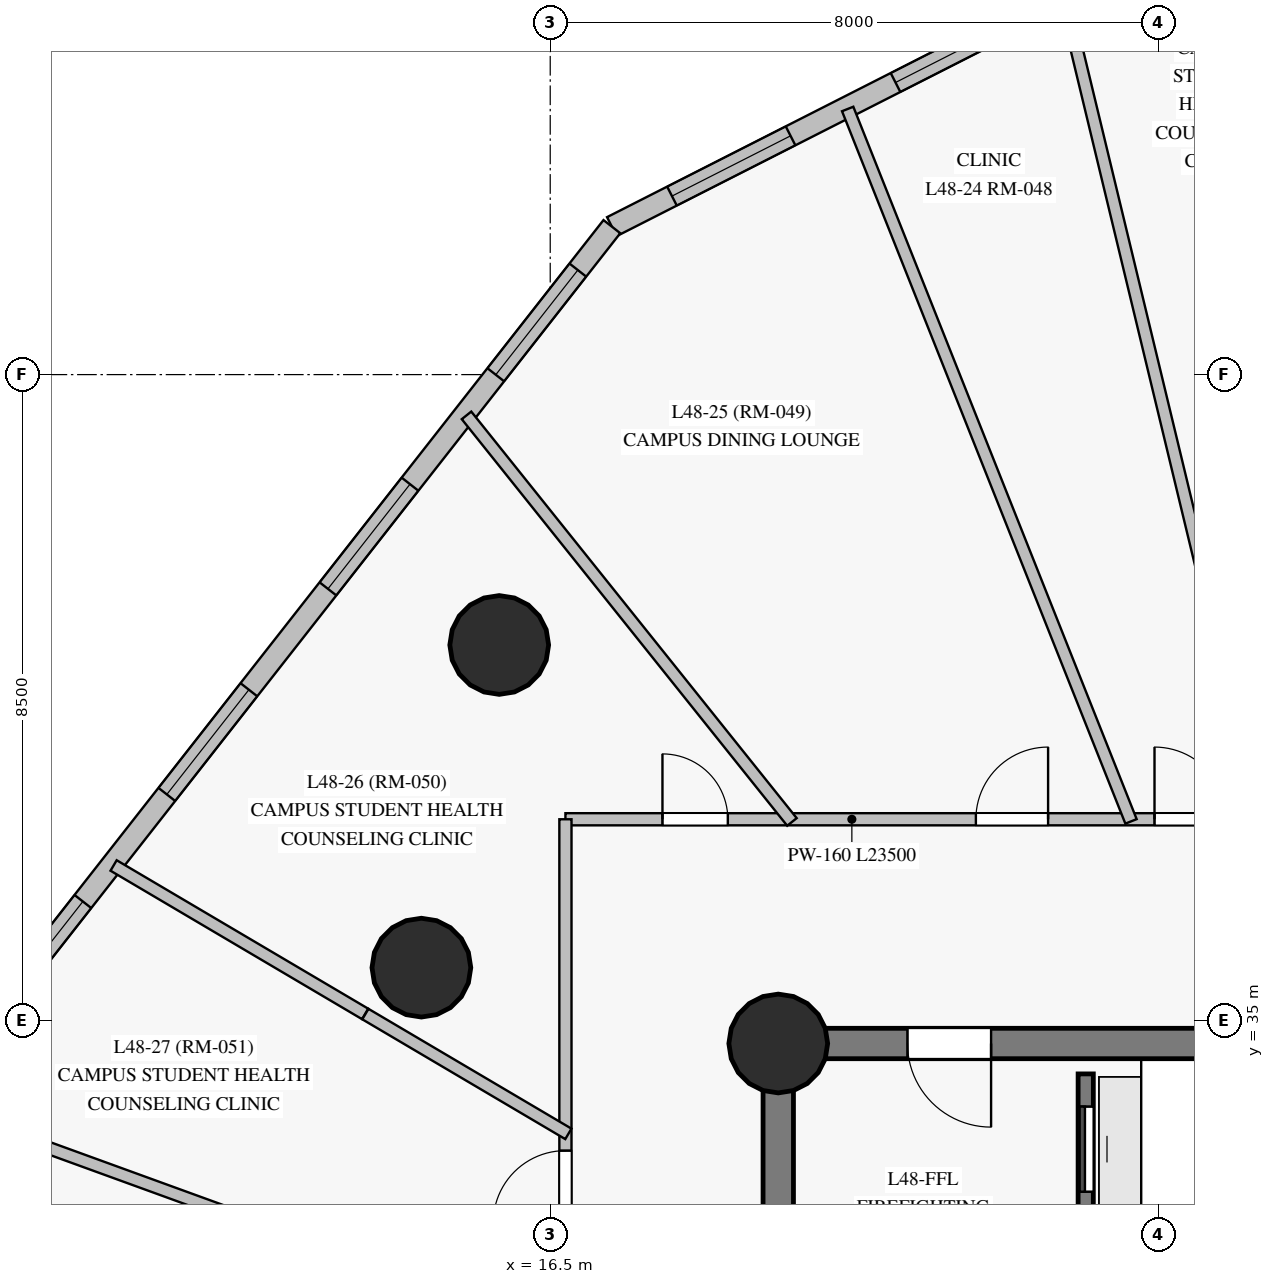
"""IFC4 building model, lengths in metres.
Left out: names, types, materials, properties, quantities, classifications, styles, units other than length and angle.
Written with IfcOpenShell. Run it as: python <this file> out.ifc"""

import sys

from ifc_helpers import new_model, si_unit, direction, frame, frame_2d, origin, origin_with_axes, origin_2d, place, context, subcontext, project, spatial, rectangle, circle, extrude, source, transform, mapped, element, fill, save


model = new_model("IFC4")
c1 = context("Model", 3, precision=1e-05, world=origin(), true_north=direction((0.0, 1.0)))
c2 = subcontext(c1, "Body", "Model", "MODEL_VIEW")
j1 = project(units=[si_unit("LENGTHUNIT", "METRE"), si_unit("PLANEANGLEUNIT", "RADIAN")], contexts=[c1])
p1 = place(None, origin())
s1 = spatial("IfcSite", under=j1, at=p1, CompositionType="ELEMENT")
p2 = place(p1, origin())
s2 = spatial("IfcBuilding", under=s1, at=p2, CompositionType="ELEMENT")
p3 = place(p2, frame((0.0, 0.0, 168.75)))
s3 = spatial("IfcBuildingStorey", under=s2, at=p3, CompositionType="ELEMENT", Elevation=168.75)
p4 = place(p3, frame((26.55, 34.7, 0.0), z_axis=(0.0, 0.0, 1.0), x_axis=(-1.0, 0.0, 0.0)))
e1 = element("IfcWall", 1, at=p4, inside=s3, PredefinedType="SHEAR", context=c2, shape_type="SweptSolid", body=[
    extrude(rectangle(XDim=7.05, YDim=0.4, at=frame_2d((3.525, 0.0))), origin(), (0.0, 0.0, 1.0), 2.825),
])
p5 = place(p4, frame((4.25, 0.0, 0.0)))
e2 = element("IfcOpeningElement", 2, at=p5, cuts=e1, PredefinedType="OPENING", context=c2, shape_type="SweptSolid", body=[
    extrude(rectangle(XDim=1.1, YDim=2.15, at=frame_2d((0.55, 1.075))), frame((0.0, 0.21, 0.0), z_axis=(0.0, -1.0, 0.0), x_axis=(1.0, 0.0, 0.0)), (0.0, 0.0, 1.0), 0.42),
])
p6 = place(p3, frame((19.5, 34.7, 0.0), z_axis=(0.0, 0.0, 1.0), x_axis=(0.0, -1.0, 0.0)))
e3 = element("IfcWall", 3, at=p6, inside=s3, PredefinedType="SHEAR", context=c2, shape_type="SweptSolid", body=[
    extrude(rectangle(XDim=16.4, YDim=0.4, at=frame_2d((8.2, 0.0))), origin(), (0.0, 0.0, 1.0), 2.825),
])
p7 = place(p6, frame((3.1, 0.0, 0.0)))
e4 = element("IfcOpeningElement", 4, at=p7, cuts=e3, PredefinedType="OPENING", context=c2, shape_type="SweptSolid", body=[
    extrude(rectangle(XDim=1.1, YDim=2.15, at=frame_2d((0.55, 1.075))), frame((0.0, 0.21, 0.0), z_axis=(0.0, -1.0, 0.0), x_axis=(1.0, 0.0, 0.0)), (0.0, 0.0, 1.0), 0.42),
])
m1 = source(origin_with_axes(), c2, "Body", "SweptSolid", [
    extrude(circle(Radius=0.65, at=origin_2d()), origin(), (0.0, 0.0, 1.0), 3.05),
])
for number, where, z_axis, x_axis in (
    (5, (19.5, 34.7, 0.0), (0.0, 0.0, 1.0), (1.0, 0.0, 0.0)),
    (6, (15.829, 39.943, 0.0), (0.0, 0.0, 1.0), (1.0, 0.0, 0.0)),
    (7, (14.805, 35.698, 0.0), (0.0, 0.0, 1.0), (1.0, 0.0, 0.0)),
):
    element("IfcColumn", number, at=place(p3, frame(where, z_axis=z_axis, x_axis=x_axis)), inside=s3, PredefinedType="COLUMN", context=c2, shape_type="MappedRepresentation", body=[
        mapped(m1, transform((0.0, 0.0, 0.0), scale=1.0)),
    ])
p8 = place(p3, frame((25.884, 49.802, 0.0), z_axis=(0.0, 0.0, 1.0), x_axis=(-0.89150888701, -0.453003205708, 0.0)))
e8 = element("IfcWall", 8, at=p8, inside=s3, PredefinedType="SOLIDWALL", context=c2, shape_type="SweptSolid", body=[
    extrude(rectangle(XDim=9.616, YDim=0.28, at=frame_2d((4.808, 0.0))), origin(), (0.0, 0.0, 1.0), 2.825),
])
p9 = place(p8, frame((0.634, 0.0, 0.85)))
e9 = element("IfcOpeningElement", 9, at=p9, cuts=e8, PredefinedType="OPENING", context=c2, shape_type="SweptSolid", body=[
    extrude(rectangle(XDim=1.75, YDim=1.65, at=frame_2d((0.875, 0.825))), frame((0.0, 0.15, 0.0), z_axis=(0.0, -1.0, 0.0), x_axis=(1.0, 0.0, 0.0)), (0.0, 0.0, 1.0), 0.3),
])
p10 = place(p8, frame((3.68, 0.0, 0.85)))
e10 = element("IfcOpeningElement", 10, at=p10, cuts=e8, PredefinedType="OPENING", context=c2, shape_type="SweptSolid", body=[
    extrude(rectangle(XDim=1.75, YDim=1.65, at=frame_2d((0.875, 0.825))), frame((0.0, 0.15, 0.0), z_axis=(0.0, -1.0, 0.0), x_axis=(1.0, 0.0, 0.0)), (0.0, 0.0, 1.0), 0.3),
])
p11 = place(p8, frame((6.979, 0.0, 0.85)))
e11 = element("IfcOpeningElement", 11, at=p11, cuts=e8, PredefinedType="OPENING", context=c2, shape_type="SweptSolid", body=[
    extrude(rectangle(XDim=1.75, YDim=1.65, at=frame_2d((0.875, 0.825))), frame((0.0, 0.15, 0.0), z_axis=(0.0, -1.0, 0.0), x_axis=(1.0, 0.0, 0.0)), (0.0, 0.0, 1.0), 0.3),
])
p12 = place(p3, frame((17.311, 45.447, 0.0), z_axis=(0.0, 0.0, 1.0), x_axis=(-0.616918014759, -0.787027422054, 0.0)))
e12 = element("IfcWall", 12, at=p12, inside=s3, PredefinedType="SOLIDWALL", context=c2, shape_type="SweptSolid", body=[
    extrude(rectangle(XDim=13.718, YDim=0.28, at=frame_2d((6.859, 0.0))), origin(), (0.0, 0.0, 1.0), 2.825),
])
p13 = place(p12, frame((0.726, 0.0, 0.85)))
e13 = element("IfcOpeningElement", 13, at=p13, cuts=e12, PredefinedType="OPENING", context=c2, shape_type="SweptSolid", body=[
    extrude(rectangle(XDim=1.75, YDim=1.65, at=frame_2d((0.875, 0.825))), frame((0.0, 0.15, 0.0), z_axis=(0.0, -1.0, 0.0), x_axis=(1.0, 0.0, 0.0)), (0.0, 0.0, 1.0), 0.3),
])
p14 = place(p12, frame((4.305, 0.0, 0.85)))
e14 = element("IfcOpeningElement", 14, at=p14, cuts=e12, PredefinedType="OPENING", context=c2, shape_type="SweptSolid", body=[
    extrude(rectangle(XDim=1.75, YDim=1.65, at=frame_2d((0.875, 0.825))), frame((0.0, 0.15, 0.0), z_axis=(0.0, -1.0, 0.0), x_axis=(1.0, 0.0, 0.0)), (0.0, 0.0, 1.0), 0.3),
])
p15 = place(p12, frame((7.741, 0.0, 0.85)))
e15 = element("IfcOpeningElement", 15, at=p15, cuts=e12, PredefinedType="OPENING", context=c2, shape_type="SweptSolid", body=[
    extrude(rectangle(XDim=1.75, YDim=1.65, at=frame_2d((0.875, 0.825))), frame((0.0, 0.15, 0.0), z_axis=(0.0, -1.0, 0.0), x_axis=(1.0, 0.0, 0.0)), (0.0, 0.0, 1.0), 0.3),
])
p16 = place(p12, frame((11.281, 0.0, 0.85)))
e16 = element("IfcOpeningElement", 16, at=p16, cuts=e12, PredefinedType="OPENING", context=c2, shape_type="SweptSolid", body=[
    extrude(rectangle(XDim=1.75, YDim=1.65, at=frame_2d((0.875, 0.825))), frame((0.0, 0.15, 0.0), z_axis=(0.0, -1.0, 0.0), x_axis=(1.0, 0.0, 0.0)), (0.0, 0.0, 1.0), 0.3),
])
p17 = place(p3, frame((23.545, 18.7, 0.0), z_axis=(0.0, 0.0, 1.0), x_axis=(0.0, 1.0, 0.0)))
e17 = element("IfcWall", 17, at=p17, inside=s3, PredefinedType="SHEAR", context=c2, shape_type="SweptSolid", body=[
    extrude(rectangle(XDim=15.6, YDim=0.2, at=frame_2d((7.8, 0.0))), origin(), (0.0, 0.0, 1.0), 2.825),
])
p18 = place(p17, frame((2.75, 0.0, 0.0)))
e18 = element("IfcOpeningElement", 18, at=p18, cuts=e17, PredefinedType="OPENING", context=c2, shape_type="SweptSolid", body=[
    extrude(rectangle(XDim=1.15, YDim=2.15, at=frame_2d((0.575, 1.075))), frame((0.0, 0.11, 0.0), z_axis=(0.0, -1.0, 0.0), x_axis=(1.0, 0.0, 0.0)), (0.0, 0.0, 1.0), 0.22),
])
p19 = place(p17, frame((0.14, 0.0, 0.0)))
e19 = element("IfcOpeningElement", 19, at=p19, cuts=e17, PredefinedType="OPENING", context=c2, shape_type="SweptSolid", body=[
    extrude(rectangle(XDim=0.88, YDim=2.1, at=frame_2d((0.44, 1.05))), frame((0.0, 0.11, 0.0), z_axis=(0.0, -1.0, 0.0), x_axis=(1.0, 0.0, 0.0)), (0.0, 0.0, 1.0), 0.22),
])
p20 = place(p17, frame((1.36, 0.0, 0.0)))
e20 = element("IfcOpeningElement", 20, at=p20, cuts=e17, PredefinedType="OPENING", context=c2, shape_type="SweptSolid", body=[
    extrude(rectangle(XDim=0.88, YDim=2.1, at=frame_2d((0.44, 1.05))), frame((0.0, 0.11, 0.0), z_axis=(0.0, -1.0, 0.0), x_axis=(1.0, 0.0, 0.0)), (0.0, 0.0, 1.0), 0.22),
])
p21 = place(p17, frame((12.1, 0.0, 0.0)))
e21 = element("IfcOpeningElement", 21, at=p21, cuts=e17, PredefinedType="OPENING", context=c2, shape_type="SweptSolid", body=[
    extrude(rectangle(XDim=1.12, YDim=2.15, at=frame_2d((0.56, 1.075))), frame((0.0, 0.11, 0.0), z_axis=(0.0, -1.0, 0.0), x_axis=(1.0, 0.0, 0.0)), (0.0, 0.0, 1.0), 0.22),
])
p22 = place(p17, frame((14.05, 0.0, 0.0)))
e22 = element("IfcOpeningElement", 22, at=p22, cuts=e17, PredefinedType="OPENING", context=c2, shape_type="SweptSolid", body=[
    extrude(rectangle(XDim=1.12, YDim=2.15, at=frame_2d((0.56, 1.075))), frame((0.0, 0.11, 0.0), z_axis=(0.0, -1.0, 0.0), x_axis=(1.0, 0.0, 0.0)), (0.0, 0.0, 1.0), 0.22),
])
p23 = place(p3, frame((16.7, 37.65, 0.0), z_axis=(0.0, 0.0, 1.0), x_axis=(1.0, 0.0, 0.0)))
e23 = element("IfcWall", 23, at=p23, inside=s3, PredefinedType="PARTITIONING", context=c2, shape_type="SweptSolid", body=[
    extrude(rectangle(XDim=23.5, YDim=0.16, at=frame_2d((11.75, 0.0))), origin(), (0.0, 0.0, 1.0), 2.375),
])
p24 = place(p23, frame((20.632, 0.0, 0.0)))
e24 = element("IfcOpeningElement", 24, at=p24, cuts=e23, PredefinedType="OPENING", context=c2, shape_type="SweptSolid", body=[
    extrude(rectangle(XDim=0.95, YDim=2.15, at=frame_2d((0.475, 1.075))), frame((0.0, 0.09, 0.0), z_axis=(0.0, -1.0, 0.0), x_axis=(1.0, 0.0, 0.0)), (0.0, 0.0, 1.0), 0.18),
])
p25 = place(p23, frame((17.34, 0.0, 0.0)))
e25 = element("IfcOpeningElement", 25, at=p25, cuts=e23, PredefinedType="OPENING", context=c2, shape_type="SweptSolid", body=[
    extrude(rectangle(XDim=0.95, YDim=2.15, at=frame_2d((0.475, 1.075))), frame((0.0, 0.09, 0.0), z_axis=(0.0, -1.0, 0.0), x_axis=(1.0, 0.0, 0.0)), (0.0, 0.0, 1.0), 0.18),
])
p26 = place(p23, frame((15.24, 0.0, 0.0)))
e26 = element("IfcOpeningElement", 26, at=p26, cuts=e23, PredefinedType="OPENING", context=c2, shape_type="SweptSolid", body=[
    extrude(rectangle(XDim=0.95, YDim=2.15, at=frame_2d((0.475, 1.075))), frame((0.0, 0.09, 0.0), z_axis=(0.0, -1.0, 0.0), x_axis=(1.0, 0.0, 0.0)), (0.0, 0.0, 1.0), 0.18),
])
p27 = place(p23, frame((13.482, 0.0, 0.0)))
e27 = element("IfcOpeningElement", 27, at=p27, cuts=e23, PredefinedType="OPENING", context=c2, shape_type="SweptSolid", body=[
    extrude(rectangle(XDim=0.95, YDim=2.15, at=frame_2d((0.475, 1.075))), frame((0.0, 0.09, 0.0), z_axis=(0.0, -1.0, 0.0), x_axis=(1.0, 0.0, 0.0)), (0.0, 0.0, 1.0), 0.18),
])
p28 = place(p23, frame((11.365, 0.0, 0.0)))
e28 = element("IfcOpeningElement", 28, at=p28, cuts=e23, PredefinedType="OPENING", context=c2, shape_type="SweptSolid", body=[
    extrude(rectangle(XDim=0.95, YDim=2.15, at=frame_2d((0.475, 1.075))), frame((0.0, 0.09, 0.0), z_axis=(0.0, -1.0, 0.0), x_axis=(1.0, 0.0, 0.0)), (0.0, 0.0, 1.0), 0.18),
])
p29 = place(p23, frame((9.588, 0.0, 0.0)))
e29 = element("IfcOpeningElement", 29, at=p29, cuts=e23, PredefinedType="OPENING", context=c2, shape_type="SweptSolid", body=[
    extrude(rectangle(XDim=0.95, YDim=2.15, at=frame_2d((0.475, 1.075))), frame((0.0, 0.09, 0.0), z_axis=(0.0, -1.0, 0.0), x_axis=(1.0, 0.0, 0.0)), (0.0, 0.0, 1.0), 0.18),
])
p30 = place(p23, frame((7.75, 0.0, 0.0)))
e30 = element("IfcOpeningElement", 30, at=p30, cuts=e23, PredefinedType="OPENING", context=c2, shape_type="SweptSolid", body=[
    extrude(rectangle(XDim=0.95, YDim=2.15, at=frame_2d((0.475, 1.075))), frame((0.0, 0.09, 0.0), z_axis=(0.0, -1.0, 0.0), x_axis=(1.0, 0.0, 0.0)), (0.0, 0.0, 1.0), 0.18),
])
p31 = place(p23, frame((5.4, 0.0, 0.0)))
e31 = element("IfcOpeningElement", 31, at=p31, cuts=e23, PredefinedType="OPENING", context=c2, shape_type="SweptSolid", body=[
    extrude(rectangle(XDim=0.95, YDim=2.15, at=frame_2d((0.475, 1.075))), frame((0.0, 0.09, 0.0), z_axis=(0.0, -1.0, 0.0), x_axis=(1.0, 0.0, 0.0)), (0.0, 0.0, 1.0), 0.18),
])
p32 = place(p23, frame((1.277, 0.0, 0.0)))
e32 = element("IfcOpeningElement", 32, at=p32, cuts=e23, PredefinedType="OPENING", context=c2, shape_type="SweptSolid", body=[
    extrude(rectangle(XDim=0.86, YDim=2.04, at=frame_2d((0.43, 1.02))), frame((0.0, 0.09, 0.0), z_axis=(0.0, -1.0, 0.0), x_axis=(1.0, 0.0, 0.0)), (0.0, 0.0, 1.0), 0.18),
])
p33 = place(p3, frame((16.7, 15.35, 0.0), z_axis=(0.0, 0.0, 1.0), x_axis=(0.0, 1.0, 0.0)))
e33 = element("IfcWall", 33, at=p33, inside=s3, PredefinedType="PARTITIONING", context=c2, shape_type="SweptSolid", body=[
    extrude(rectangle(XDim=22.3, YDim=0.16, at=frame_2d((11.15, 0.0))), origin(), (0.0, 0.0, 1.0), 2.275),
])
p34 = place(p33, frame((11.383, 0.0, 0.0)))
e34 = element("IfcOpeningElement", 34, at=p34, cuts=e33, PredefinedType="OPENING", context=c2, shape_type="SweptSolid", body=[
    extrude(rectangle(XDim=0.86, YDim=2.1, at=frame_2d((0.43, 1.05))), frame((0.0, 0.09, 0.0), z_axis=(0.0, -1.0, 0.0), x_axis=(1.0, 0.0, 0.0)), (0.0, 0.0, 1.0), 0.18),
])
p35 = place(p33, frame((7.33, 0.0, 0.0)))
e35 = element("IfcOpeningElement", 35, at=p35, cuts=e33, PredefinedType="OPENING", context=c2, shape_type="SweptSolid", body=[
    extrude(rectangle(XDim=0.96, YDim=2.15, at=frame_2d((0.48, 1.075))), frame((0.0, 0.09, 0.0), z_axis=(0.0, -1.0, 0.0), x_axis=(1.0, 0.0, 0.0)), (0.0, 0.0, 1.0), 0.18),
])
p36 = place(p33, frame((4.61, 0.0, 0.0)))
e36 = element("IfcOpeningElement", 36, at=p36, cuts=e33, PredefinedType="OPENING", context=c2, shape_type="SweptSolid", body=[
    extrude(rectangle(XDim=0.95, YDim=2.15, at=frame_2d((0.475, 1.075))), frame((0.0, 0.09, 0.0), z_axis=(0.0, -1.0, 0.0), x_axis=(1.0, 0.0, 0.0)), (0.0, 0.0, 1.0), 0.18),
])
p37 = place(p33, frame((16.99, 0.0, 0.0)))
e37 = element("IfcOpeningElement", 37, at=p37, cuts=e33, PredefinedType="OPENING", context=c2, shape_type="SweptSolid", body=[
    extrude(rectangle(XDim=0.95, YDim=2.15, at=frame_2d((0.475, 1.075))), frame((0.0, 0.09, 0.0), z_axis=(0.0, -1.0, 0.0), x_axis=(1.0, 0.0, 0.0)), (0.0, 0.0, 1.0), 0.18),
])
p38 = place(p33, frame((15.86, 0.0, 0.0)))
e38 = element("IfcOpeningElement", 38, at=p38, cuts=e33, PredefinedType="OPENING", context=c2, shape_type="SweptSolid", body=[
    extrude(rectangle(XDim=0.95, YDim=2.15, at=frame_2d((0.475, 1.075))), frame((0.0, 0.09, 0.0), z_axis=(0.0, -1.0, 0.0), x_axis=(1.0, 0.0, 0.0)), (0.0, 0.0, 1.0), 0.18),
])
p39 = place(p33, frame((14.02, 0.0, 0.0)))
e39 = element("IfcOpeningElement", 39, at=p39, cuts=e33, PredefinedType="OPENING", context=c2, shape_type="SweptSolid", body=[
    extrude(rectangle(XDim=0.95, YDim=2.15, at=frame_2d((0.475, 1.075))), frame((0.0, 0.09, 0.0), z_axis=(0.0, -1.0, 0.0), x_axis=(1.0, 0.0, 0.0)), (0.0, 0.0, 1.0), 0.18),
])
p40 = place(p3, frame((25.881, 37.606, 0.0), z_axis=(0.0, 0.0, 1.0), x_axis=(-0.234601997251, 0.972091509522, 0.0)))
e40 = element("IfcWall", 40, at=p40, inside=s3, PredefinedType="PARTITIONING", context=c2, shape_type="SweptSolid", body=[
    extrude(rectangle(XDim=11.147, YDim=0.16, at=frame_2d((5.574, 0.0))), origin(), (0.0, 0.0, 1.0), 2.825),
])
p41 = place(p3, frame((24.141, 37.622, 0.0), z_axis=(0.0, 0.0, 1.0), x_axis=(-0.369574647979, 0.929201043677, 0.0)))
e41 = element("IfcWall", 41, at=p41, inside=s3, PredefinedType="PARTITIONING", context=c2, shape_type="SweptSolid", body=[
    extrude(rectangle(XDim=10.087, YDim=0.16, at=frame_2d((5.043, 0.0))), origin(), (0.0, 0.0, 1.0), 2.825),
])
p42 = place(p3, frame((16.742, 30.838, 0.0), z_axis=(0.0, 0.0, 1.0), x_axis=(-0.939833664455, 0.341632380137, 0.0)))
e42 = element("IfcWall", 42, at=p42, inside=s3, PredefinedType="PARTITIONING", context=c2, shape_type="SweptSolid", body=[
    extrude(rectangle(XDim=8.501, YDim=0.16, at=frame_2d((4.25, 0.0))), origin(), (0.0, 0.0, 1.0), 2.825),
])
p43 = place(p3, frame((19.68, 37.615, 0.0), z_axis=(0.0, 0.0, 1.0), x_axis=(-0.624925342078, 0.780684518118, 0.0)))
e43 = element("IfcWall", 43, at=p43, inside=s3, PredefinedType="PARTITIONING", context=c2, shape_type="SweptSolid", body=[
    extrude(rectangle(XDim=6.851, YDim=0.16, at=frame_2d((3.426, 0.0))), origin(), (0.0, 0.0, 1.0), 2.825),
])
p44 = place(p3, frame((14.065, 35.089, 0.0), z_axis=(0.0, 0.0, 1.0), x_axis=(-0.861198344714, 0.508269034136, 0.0)))
e44 = element("IfcWall", 44, at=p44, inside=s3, PredefinedType="PARTITIONING", context=c2, shape_type="SweptSolid", body=[
    extrude(rectangle(XDim=3.843, YDim=0.16, at=frame_2d((1.921, 0.0))), origin(), (0.0, 0.0, 1.0), 2.825),
])
p45 = place(p3, frame((16.739, 33.511, 0.0), z_axis=(0.0, 0.0, 1.0), x_axis=(-0.861200683606, 0.508265071155, 0.0)))
e45 = element("IfcWall", 45, at=p45, inside=s3, PredefinedType="PARTITIONING", context=c2, shape_type="SweptSolid", body=[
    extrude(rectangle(XDim=3.101, YDim=0.16, at=frame_2d((1.551, 0.0))), origin(), (0.0, 0.0, 1.0), 2.825),
])
m2 = source(origin_with_axes(), c2, "Body", "SweptSolid", [
    extrude(rectangle(XDim=1.75, YDim=1.65, at=frame_2d((0.875, 0.825))), frame((0.0, 0.03, 0.0), z_axis=(0.0, -1.0, 0.0), x_axis=(1.0, 0.0, 0.0)), (0.0, 0.0, 1.0), 0.06),
])
p46 = place(p10, origin())
e46 = element("IfcWindow", 46, at=p46, inside=s3, PartitioningType="SINGLE_PANEL", PredefinedType="WINDOW", context=c2, shape_type="MappedRepresentation", body=[
    mapped(m2, transform((0.0, 0.0, 0.0), scale=1.0)),
])
fill(e10, e46)
p47 = place(p11, origin())
e47 = element("IfcWindow", 47, at=p47, inside=s3, PartitioningType="SINGLE_PANEL", PredefinedType="WINDOW", context=c2, shape_type="MappedRepresentation", body=[
    mapped(m2, transform((0.0, 0.0, 0.0), scale=1.0)),
])
fill(e11, e47)
p48 = place(p13, origin())
e48 = element("IfcWindow", 48, at=p48, inside=s3, PartitioningType="SINGLE_PANEL", PredefinedType="WINDOW", context=c2, shape_type="MappedRepresentation", body=[
    mapped(m2, transform((0.0, 0.0, 0.0), scale=1.0)),
])
fill(e13, e48)
p49 = place(p14, origin())
e49 = element("IfcWindow", 49, at=p49, inside=s3, PartitioningType="SINGLE_PANEL", PredefinedType="WINDOW", context=c2, shape_type="MappedRepresentation", body=[
    mapped(m2, transform((0.0, 0.0, 0.0), scale=1.0)),
])
fill(e14, e49)
p50 = place(p15, origin())
e50 = element("IfcWindow", 50, at=p50, inside=s3, PartitioningType="SINGLE_PANEL", PredefinedType="WINDOW", context=c2, shape_type="MappedRepresentation", body=[
    mapped(m2, transform((0.0, 0.0, 0.0), scale=1.0)),
])
fill(e15, e50)
p51 = place(p16, origin())
e51 = element("IfcWindow", 51, at=p51, inside=s3, PartitioningType="SINGLE_PANEL", PredefinedType="WINDOW", context=c2, shape_type="MappedRepresentation", body=[
    mapped(m2, transform((0.0, 0.0, 0.0), scale=1.0)),
])
fill(e16, e51)
m3 = source(origin_with_axes(), c2, "Body", "SweptSolid", [
    extrude(rectangle(XDim=1.1, YDim=2.15, at=frame_2d((0.55, 1.075))), frame((0.0, 0.025, 0.0), z_axis=(0.0, -1.0, 0.0), x_axis=(1.0, 0.0, 0.0)), (0.0, 0.0, 1.0), 0.05),
])
p52 = place(p5, origin())
e52 = element("IfcDoor", 52, at=p52, inside=s3, OperationType="SINGLE_SWING_LEFT", PredefinedType="DOOR", context=c2, shape_type="MappedRepresentation", body=[
    mapped(m3, transform((0.0, 0.0, 0.0), scale=1.0)),
])
fill(e2, e52)
m4 = source(origin_with_axes(), c2, "Body", "SweptSolid", [
    extrude(rectangle(XDim=1.12, YDim=2.15, at=frame_2d((0.56, 1.075))), frame((0.0, 0.025, 0.0), z_axis=(0.0, -1.0, 0.0), x_axis=(1.0, 0.0, 0.0)), (0.0, 0.0, 1.0), 0.05),
])
p53 = place(p22, origin())
e53 = element("IfcDoor", 53, at=p53, inside=s3, OperationType="SLIDING_TO_RIGHT", PredefinedType="DOOR", context=c2, shape_type="MappedRepresentation", body=[
    mapped(m4, transform((0.0, 0.0, 0.0), scale=1.0)),
])
fill(e22, e53)
m5 = source(origin_with_axes(), c2, "Body", "SweptSolid", [
    extrude(rectangle(XDim=0.95, YDim=2.15, at=frame_2d((0.475, 1.075))), frame((0.0, 0.025, 0.0), z_axis=(0.0, -1.0, 0.0), x_axis=(1.0, 0.0, 0.0)), (0.0, 0.0, 1.0), 0.05),
])
p54 = place(p30, origin())
e54 = element("IfcDoor", 54, at=p54, inside=s3, OperationType="SINGLE_SWING_LEFT", PredefinedType="DOOR", context=c2, shape_type="MappedRepresentation", body=[
    mapped(m5, transform((0.0, 0.0, 0.0), scale=1.0)),
])
fill(e30, e54)
p55 = place(p31, origin())
e55 = element("IfcDoor", 55, at=p55, inside=s3, OperationType="SINGLE_SWING_RIGHT", PredefinedType="DOOR", context=c2, shape_type="MappedRepresentation", body=[
    mapped(m5, transform((0.0, 0.0, 0.0), scale=1.0)),
])
fill(e31, e55)
p56 = place(p37, origin())
e56 = element("IfcDoor", 56, at=p56, inside=s3, OperationType="SINGLE_SWING_LEFT", PredefinedType="DOOR", context=c2, shape_type="MappedRepresentation", body=[
    mapped(m5, transform((0.0, 0.0, 0.0), scale=1.0)),
])
fill(e37, e56)
m6 = source(origin_with_axes(), c2, "Body", "SweptSolid", [
    extrude(rectangle(XDim=0.86, YDim=2.04, at=frame_2d((0.43, 1.02))), frame((0.0, 0.025, 0.0), z_axis=(0.0, -1.0, 0.0), x_axis=(1.0, 0.0, 0.0)), (0.0, 0.0, 1.0), 0.05),
])
p57 = place(p32, origin())
e57 = element("IfcDoor", 57, at=p57, inside=s3, OperationType="SINGLE_SWING_LEFT", PredefinedType="DOOR", context=c2, shape_type="MappedRepresentation", body=[
    mapped(m6, transform((0.0, 0.0, 0.0), scale=1.0)),
])
fill(e32, e57)
save(model, sys.argv[1])
